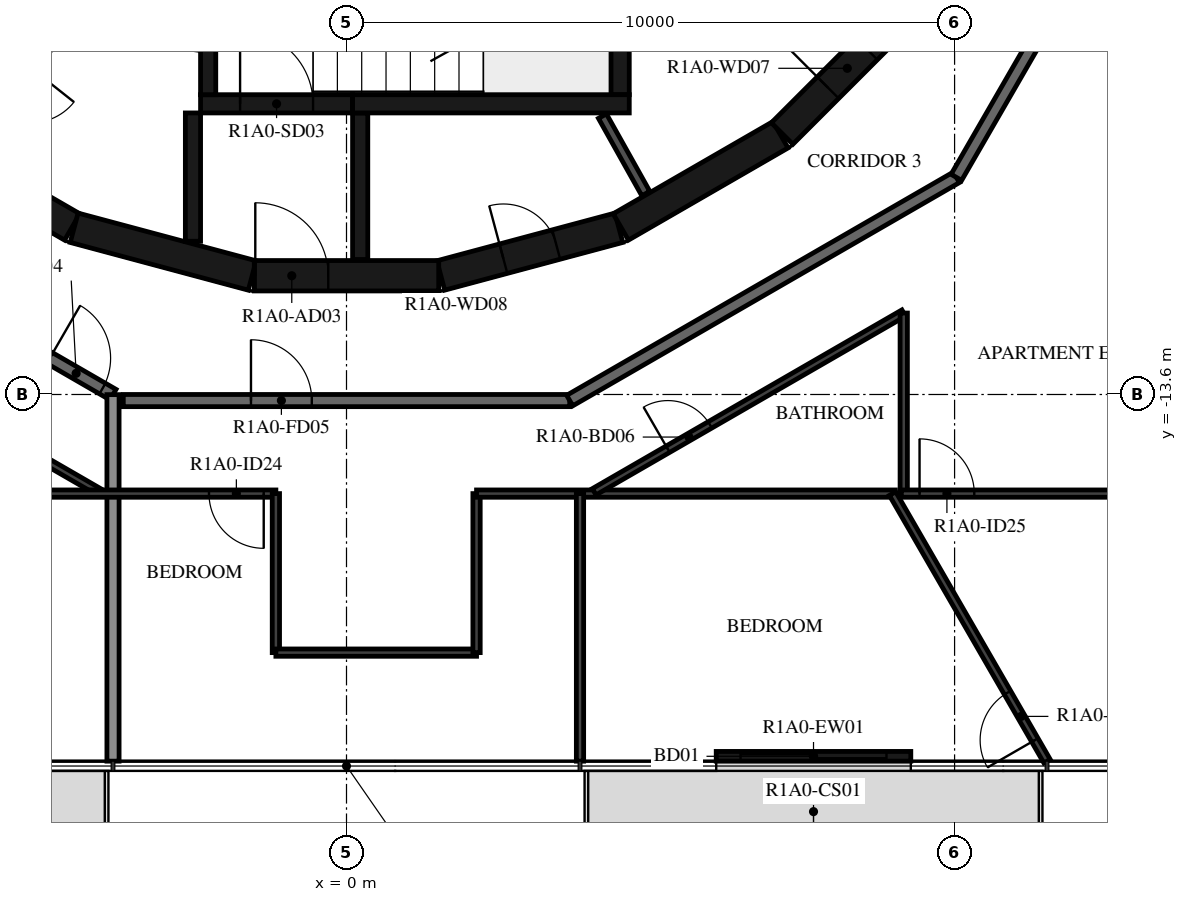
"""IFC4 building model, lengths in metres.
Left out: names, types, materials, properties, quantities, classifications, styles, units other than length and angle.
Written with IfcOpenShell. Run it as: python <this file> out.ifc"""

import sys

from ifc_helpers import new_model, si_unit, direction, frame, frame_2d, origin, place, context, subcontext, project, spatial, rectangle, extrude, element, fill, save


model = new_model("IFC4")
c1 = context("Model", 3, precision=1e-05, world=origin(), true_north=direction((0.0, 1.0)))
c2 = subcontext(c1, "Body", "Model", "MODEL_VIEW")
j1 = project(units=[si_unit("LENGTHUNIT", "METRE"), si_unit("PLANEANGLEUNIT", "RADIAN")], contexts=[c1])
p1 = place(None, origin())
s1 = spatial("IfcSite", under=j1, at=p1, CompositionType="ELEMENT")
p2 = place(p1, origin())
s2 = spatial("IfcBuilding", under=s1, at=p2, CompositionType="ELEMENT")
p3 = place(p2, frame((0.0, 0.0, 45.4)))
s3 = spatial("IfcBuildingStorey", under=s2, at=p3, CompositionType="ELEMENT", Elevation=45.4)
p4 = place(p3, frame((6.08, -19.55, 0.0), z_axis=(0.0, 0.0, 1.0), x_axis=(1.0, 0.0, 0.0)))
e1 = element("IfcWall", 1, at=p4, inside=s3, PredefinedType="STANDARD", context=c2, shape_type="SweptSolid", body=[
    extrude(rectangle(XDim=3.2, YDim=0.16, at=frame_2d((1.6, 0.0))), origin(), (0.0, 0.0, 1.0), 3.12),
])
p5 = place(p4, frame((0.4, 0.0, 0.0)))
e2 = element("IfcOpeningElement", 2, at=p5, cuts=e1, PredefinedType="OPENING", context=c2, shape_type="SweptSolid", body=[
    extrude(rectangle(XDim=2.4, YDim=2.4, at=frame_2d((1.2, 1.2))), frame((0.0, 0.09, 0.0), z_axis=(0.0, -1.0, 0.0), x_axis=(1.0, 0.0, 0.0)), (0.0, 0.0, 1.0), 0.18),
])
p6 = place(p3, frame((1.55, -11.643, 0.0), z_axis=(0.0, 0.0, 1.0), x_axis=(0.965948410781, 0.258734743916, 0.0)))
e3 = element("IfcWall", 3, at=p6, inside=s3, PredefinedType="SHEAR", context=c2, shape_type="SweptSolid", body=[
    extrude(rectangle(XDim=3.033, YDim=0.5, at=frame_2d((1.516, 0.0))), origin(), (0.0, 0.0, 1.0), 3.12),
])
p7 = place(p6, frame((1.066, 0.0, 0.0)))
e4 = element("IfcOpeningElement", 4, at=p7, cuts=e3, PredefinedType="OPENING", context=c2, shape_type="SweptSolid", body=[
    extrude(rectangle(XDim=0.9, YDim=2.1, at=frame_2d((0.45, 1.05))), frame((0.0, 0.26, 0.0), z_axis=(0.0, -1.0, 0.0), x_axis=(1.0, 0.0, 0.0)), (0.0, 0.0, 1.0), 0.52),
])
p8 = place(p3, frame((4.51, -10.845, 0.0), z_axis=(0.0, 0.0, 1.0), x_axis=(0.865975092491, 0.500087131594, 0.0)))
e5 = element("IfcWall", 5, at=p8, inside=s3, PredefinedType="SHEAR", context=c2, shape_type="SweptSolid", body=[
    extrude(rectangle(XDim=3.033, YDim=0.5, at=frame_2d((1.516, 0.0))), origin(), (0.0, 0.0, 1.0), 3.12),
])
p9 = place(p3, frame((7.164, -9.308, 0.0), z_axis=(0.0, 0.0, 1.0), x_axis=(0.707106781187, 0.707106781187, 0.0)))
e6 = element("IfcWall", 6, at=p9, inside=s3, PredefinedType="SHEAR", context=c2, shape_type="SweptSolid", body=[
    extrude(rectangle(XDim=3.032, YDim=0.5, at=frame_2d((1.516, 0.0))), origin(), (0.0, 0.0, 1.0), 3.12),
])
p10 = place(p9, frame((1.066, 0.0, 0.0)))
e7 = element("IfcOpeningElement", 7, at=p10, cuts=e6, PredefinedType="OPENING", context=c2, shape_type="SweptSolid", body=[
    extrude(rectangle(XDim=0.9, YDim=2.1, at=frame_2d((0.45, 1.05))), frame((0.0, 0.26, 0.0), z_axis=(0.0, -1.0, 0.0), x_axis=(1.0, 0.0, 0.0)), (0.0, 0.0, 1.0), 0.52),
])
for number, where, z_axis, x_axis in (
    (8, (-7.137, -9.329, 0.0), (0.0, 0.0, 1.0), (0.866, -0.5, 0.0)),
    (9, (-4.479, -10.858, 0.0), (0.0, 0.0, 1.0), (0.966, -0.259, 0.0)),
):
    element("IfcWall", number, at=place(p3, frame(where, z_axis=z_axis, x_axis=x_axis)), inside=s3, PredefinedType="SHEAR", context=c2, shape_type="SweptSolid", body=[
        extrude(rectangle(XDim=3.033, YDim=0.5, at=frame_2d((1.516, 0.0))), origin(), (0.0, 0.0, 1.0), 3.12),
    ])
p11 = place(p3, frame((-1.516, -11.647, 0.0), z_axis=(0.0, 0.0, 1.0), x_axis=(1.0, 0.0, 0.0)))
e10 = element("IfcWall", 10, at=p11, inside=s3, PredefinedType="SHEAR", context=c2, shape_type="SweptSolid", body=[
    extrude(rectangle(XDim=3.033, YDim=0.5, at=frame_2d((1.516, 0.0))), origin(), (0.0, 0.0, 1.0), 3.12),
])
p12 = place(p11, frame((0.016, 0.0, 0.0)))
e11 = element("IfcOpeningElement", 11, at=p12, cuts=e10, PredefinedType="OPENING", context=c2, shape_type="SweptSolid", body=[
    extrude(rectangle(XDim=1.2, YDim=2.1, at=frame_2d((0.6, 1.05))), frame((0.0, 0.26, 0.0), z_axis=(0.0, -1.0, 0.0), x_axis=(1.0, 0.0, 0.0)), (0.0, 0.0, 1.0), 0.52),
])
p13 = place(p3, frame((-2.275, -8.67, 0.0), z_axis=(0.0, 0.0, 1.0), x_axis=(0.0, 1.0, 0.0)))
e12 = element("IfcWall", 12, at=p13, inside=s3, PredefinedType="SHEAR", context=c2, shape_type="SweptSolid", body=[
    extrude(rectangle(XDim=3.32, YDim=0.25, at=frame_2d((1.66, 0.0))), origin(), (0.0, 0.0, 1.0), 3.12),
])
p14 = place(p3, frame((4.5, -8.67, 0.0), z_axis=(0.0, 0.0, 1.0), x_axis=(0.0, 1.0, 0.0)))
e13 = element("IfcWall", 13, at=p14, inside=s3, PredefinedType="SHEAR", context=c2, shape_type="SweptSolid", body=[
    extrude(rectangle(XDim=3.32, YDim=0.3, at=frame_2d((1.66, 0.0))), origin(), (0.0, 0.0, 1.0), 3.12),
])
p15 = place(p3, frame((0.1, -8.82, 0.0), z_axis=(0.0, 0.0, 1.0), x_axis=(1.0, 0.0, 0.0)))
e14 = element("IfcWall", 14, at=p15, inside=s3, PredefinedType="SHEAR", context=c2, shape_type="SweptSolid", body=[
    extrude(rectangle(XDim=4.55, YDim=0.3, at=frame_2d((2.275, 0.0))), origin(), (0.0, 0.0, 1.0), 3.12),
])
p16 = place(p3, frame((-2.4, -8.82, 0.0), z_axis=(0.0, 0.0, 1.0), x_axis=(1.0, 0.0, 0.0)))
e15 = element("IfcWall", 15, at=p16, inside=s3, PredefinedType="SHEAR", context=c2, shape_type="SweptSolid", body=[
    extrude(rectangle(XDim=2.5, YDim=0.3, at=frame_2d((1.25, 0.0))), origin(), (0.0, 0.0, 1.0), 3.12),
])
p17 = place(p16, frame((0.65, 0.0, 0.0)))
e16 = element("IfcOpeningElement", 16, at=p17, cuts=e15, PredefinedType="OPENING", context=c2, shape_type="SweptSolid", body=[
    extrude(rectangle(XDim=1.2, YDim=2.1, at=frame_2d((0.6, 1.05))), frame((0.0, 0.16, 0.0), z_axis=(0.0, -1.0, 0.0), x_axis=(1.0, 0.0, 0.0)), (0.0, 0.0, 1.0), 0.32),
])
p18 = place(p3, frame((-2.525, -8.97, 0.0), z_axis=(0.0, 0.0, 1.0), x_axis=(0.0, -1.0, 0.0)))
e17 = element("IfcWall", 17, at=p18, inside=s3, PredefinedType="SHEAR", context=c2, shape_type="SweptSolid", body=[
    extrude(rectangle(XDim=2.11, YDim=0.25, at=frame_2d((1.055, 0.0))), origin(), (0.0, 0.0, 1.0), 3.12),
])
p19 = place(p3, frame((0.225, -8.97, 0.0), z_axis=(0.0, 0.0, 1.0), x_axis=(0.0, -1.0, 0.0)))
e18 = element("IfcWall", 18, at=p19, inside=s3, PredefinedType="SHEAR", context=c2, shape_type="SweptSolid", body=[
    extrude(rectangle(XDim=2.41, YDim=0.25, at=frame_2d((1.205, 0.0))), origin(), (0.0, 0.0, 1.0), 3.12),
])
p20 = place(p3, frame((4.922, -10.296, 0.0), z_axis=(0.0, 0.0, 1.0), x_axis=(-0.48860846254, 0.872503163509, 0.0)))
e19 = element("IfcWall", 19, at=p20, inside=s3, PredefinedType="PARTITIONING", context=c2, shape_type="SweptSolid", body=[
    extrude(rectangle(XDim=1.459, YDim=0.15, at=frame_2d((0.73, 0.0))), origin(), (0.0, 0.0, 1.0), 3.12),
])
p21 = place(p3, frame((-4.706, -7.625, 0.0), z_axis=(0.0, 0.0, 1.0), x_axis=(-0.621392599334, -0.783499353856, 0.0)))
e20 = element("IfcWall", 20, at=p21, inside=s3, PredefinedType="PARTITIONING", context=c2, shape_type="SweptSolid", body=[
    extrude(rectangle(XDim=2.447, YDim=0.15, at=frame_2d((1.224, 0.0))), origin(), (0.0, 0.0, 1.0), 3.12),
])
p22 = place(p21, frame((0.774, 0.0, 0.0)))
e21 = element("IfcOpeningElement", 21, at=p22, cuts=e20, PredefinedType="OPENING", context=c2, shape_type="SweptSolid", body=[
    extrude(rectangle(XDim=0.9, YDim=2.1, at=frame_2d((0.45, 1.05))), frame((0.0, 0.085, 0.0), z_axis=(0.0, -1.0, 0.0), x_axis=(1.0, 0.0, 0.0)), (0.0, 0.0, 1.0), 0.17),
])
p23 = place(p3, frame((-10.029, -10.029, 0.0), z_axis=(0.0, 0.0, 1.0), x_axis=(0.866022878987, -0.500004373052, 0.0)))
e22 = element("IfcWall", 22, at=p23, inside=s3, PredefinedType="STANDARD", context=c2, shape_type="SweptSolid", body=[
    extrude(rectangle(XDim=7.146, YDim=0.2, at=frame_2d((3.573, 0.0))), origin(), (0.0, 0.0, 1.0), 3.12),
])
p24 = place(p23, frame((5.947, 0.0, 0.0)))
e23 = element("IfcOpeningElement", 23, at=p24, cuts=e22, PredefinedType="OPENING", context=c2, shape_type="SweptSolid", body=[
    extrude(rectangle(XDim=1.0, YDim=2.1, at=frame_2d((0.5, 1.05))), frame((0.0, 0.11, 0.0), z_axis=(0.0, -1.0, 0.0), x_axis=(1.0, 0.0, 0.0)), (0.0, 0.0, 1.0), 0.22),
])
p25 = place(p3, frame((-3.671, -13.7, 0.0), z_axis=(0.0, 0.0, 1.0), x_axis=(1.0, 0.0, 0.0)))
e24 = element("IfcWall", 24, at=p25, inside=s3, PredefinedType="STANDARD", context=c2, shape_type="SweptSolid", body=[
    extrude(rectangle(XDim=7.342, YDim=0.2, at=frame_2d((3.671, 0.0))), origin(), (0.0, 0.0, 1.0), 3.12),
])
p26 = place(p25, frame((2.1, 0.0, 0.0)))
e25 = element("IfcOpeningElement", 25, at=p26, cuts=e24, PredefinedType="OPENING", context=c2, shape_type="SweptSolid", body=[
    extrude(rectangle(XDim=1.0, YDim=2.1, at=frame_2d((0.5, 1.05))), frame((0.0, 0.11, 0.0), z_axis=(0.0, -1.0, 0.0), x_axis=(1.0, 0.0, 0.0)), (0.0, 0.0, 1.0), 0.22),
])
p27 = place(p3, frame((3.671, -13.7, 0.0), z_axis=(0.0, 0.0, 1.0), x_axis=(0.866024439905, 0.500001669485, 0.0)))
e26 = element("IfcWall", 26, at=p27, inside=s3, PredefinedType="STANDARD", context=c2, shape_type="SweptSolid", body=[
    extrude(rectangle(XDim=7.342, YDim=0.2, at=frame_2d((3.671, 0.0))), origin(), (0.0, 0.0, 1.0), 3.12),
])
p28 = place(p3, frame((10.029, -10.029, 0.0), z_axis=(0.0, 0.0, 1.0), x_axis=(0.50001606911, 0.866016126081, 0.0)))
e27 = element("IfcWall", 27, at=p28, inside=s3, PredefinedType="STANDARD", context=c2, shape_type="SweptSolid", body=[
    extrude(rectangle(XDim=3.671, YDim=0.2, at=frame_2d((1.835, 0.0))), origin(), (0.0, 0.0, 1.0), 3.12),
])
p29 = place(p3, frame((-3.84, -19.63, 0.0), z_axis=(0.0, 0.0, 1.0), x_axis=(0.0, 1.0, 0.0)))
e28 = element("IfcWall", 28, at=p29, inside=s3, PredefinedType="STANDARD", context=c2, shape_type="SweptSolid", body=[
    extrude(rectangle(XDim=6.028, YDim=0.2, at=frame_2d((3.014, 0.0))), origin(), (0.0, 0.0, 1.0), 2.73),
])
p30 = place(p3, frame((18.694, -10.793, 0.0), z_axis=(0.0, 0.0, 1.0), x_axis=(-0.865964895271, 0.500104789178, 0.0)))
e29 = element("IfcWall", 29, at=p30, inside=s3, PredefinedType="STANDARD", context=c2, shape_type="SweptSolid", body=[
    extrude(rectangle(XDim=7.885, YDim=0.2, at=frame_2d((3.943, 0.0))), origin(), (0.0, 0.0, 1.0), 3.12),
])
p31 = place(p3, frame((-11.127, -11.127, 0.0), z_axis=(0.0, 0.0, 1.0), x_axis=(0.866032360344, -0.499987950692, 0.0)))
e30 = element("IfcWall", 30, at=p31, inside=s3, PredefinedType="PARTITIONING", context=c2, shape_type="SweptSolid", body=[
    extrude(rectangle(XDim=8.146, YDim=0.12, at=frame_2d((4.073, 0.0))), origin(), (0.0, 0.0, 1.0), 3.12),
])
p32 = place(p31, frame((1.357, 0.0, 0.0)))
e31 = element("IfcOpeningElement", 31, at=p32, cuts=e30, PredefinedType="OPENING", context=c2, shape_type="SweptSolid", body=[
    extrude(rectangle(XDim=0.8, YDim=2.1, at=frame_2d((0.4, 1.05))), frame((0.0, 0.07, 0.0), z_axis=(0.0, -1.0, 0.0), x_axis=(1.0, 0.0, 0.0)), (0.0, 0.0, 1.0), 0.14),
])
p33 = place(p3, frame((-1.161, -15.23, 0.0), z_axis=(0.0, 0.0, 1.0), x_axis=(-1.0, 0.0, 0.0)))
e32 = element("IfcWall", 32, at=p33, inside=s3, PredefinedType="PARTITIONING", context=c2, shape_type="SweptSolid", body=[
    extrude(rectangle(XDim=18.726, YDim=0.12, at=frame_2d((9.363, 0.0))), origin(), (0.0, 0.0, 1.0), 3.12),
])
p34 = place(p33, frame((9.297, 0.0, 0.0)))
e33 = element("IfcOpeningElement", 33, at=p34, cuts=e32, PredefinedType="OPENING", context=c2, shape_type="SweptSolid", body=[
    extrude(rectangle(XDim=0.9, YDim=2.1, at=frame_2d((0.45, 1.05))), frame((0.0, 0.07, 0.0), z_axis=(0.0, -1.0, 0.0), x_axis=(1.0, 0.0, 0.0)), (0.0, 0.0, 1.0), 0.14),
])
p35 = place(p33, frame((15.755, 0.0, 0.0)))
e34 = element("IfcOpeningElement", 34, at=p35, cuts=e32, PredefinedType="OPENING", context=c2, shape_type="SweptSolid", body=[
    extrude(rectangle(XDim=0.9, YDim=2.1, at=frame_2d((0.45, 1.05))), frame((0.0, 0.07, 0.0), z_axis=(0.0, -1.0, 0.0), x_axis=(1.0, 0.0, 0.0)), (0.0, 0.0, 1.0), 0.14),
])
p36 = place(p33, frame((0.2, 0.0, 0.0)))
e35 = element("IfcOpeningElement", 35, at=p36, cuts=e32, PredefinedType="OPENING", context=c2, shape_type="SweptSolid", body=[
    extrude(rectangle(XDim=0.9, YDim=2.1, at=frame_2d((0.45, 1.05))), frame((0.0, 0.07, 0.0), z_axis=(0.0, -1.0, 0.0), x_axis=(1.0, 0.0, 0.0)), (0.0, 0.0, 1.0), 0.14),
])
p37 = place(p3, frame((-1.161, -15.23, 0.0), z_axis=(0.0, 0.0, 1.0), x_axis=(0.0, -1.0, 0.0)))
e36 = element("IfcWall", 36, at=p37, inside=s3, PredefinedType="PARTITIONING", context=c2, shape_type="SweptSolid", body=[
    extrude(rectangle(XDim=2.615, YDim=0.12, at=frame_2d((1.308, 0.0))), origin(), (0.0, 0.0, 1.0), 3.12),
])
p38 = place(p3, frame((-1.161, -17.845, 0.0), z_axis=(0.0, 0.0, 1.0), x_axis=(1.0, 0.0, 0.0)))
e37 = element("IfcWall", 37, at=p38, inside=s3, PredefinedType="PARTITIONING", context=c2, shape_type="SweptSolid", body=[
    extrude(rectangle(XDim=3.3, YDim=0.12, at=frame_2d((1.65, 0.0))), origin(), (0.0, 0.0, 1.0), 3.12),
])
p39 = place(p3, frame((2.139, -17.845, 0.0), z_axis=(0.0, 0.0, 1.0), x_axis=(0.0, 1.0, 0.0)))
e38 = element("IfcWall", 38, at=p39, inside=s3, PredefinedType="PARTITIONING", context=c2, shape_type="SweptSolid", body=[
    extrude(rectangle(XDim=2.615, YDim=0.12, at=frame_2d((1.308, 0.0))), origin(), (0.0, 0.0, 1.0), 3.12),
])
p40 = place(p3, frame((2.139, -15.23, 0.0), z_axis=(0.0, 0.0, 1.0), x_axis=(1.0, 0.0, 0.0)))
e39 = element("IfcWall", 39, at=p40, inside=s3, PredefinedType="PARTITIONING", context=c2, shape_type="SweptSolid", body=[
    extrude(rectangle(XDim=6.887, YDim=0.12, at=frame_2d((3.444, 0.0))), origin(), (0.0, 0.0, 1.0), 3.12),
])
p41 = place(p3, frame((4.073, -15.2, 0.0), z_axis=(0.0, 0.0, 1.0), x_axis=(0.866034128446, 0.499984888139, 0.0)))
e40 = element("IfcWall", 40, at=p41, inside=s3, PredefinedType="PARTITIONING", context=c2, shape_type="SweptSolid", body=[
    extrude(rectangle(XDim=5.879, YDim=0.12, at=frame_2d((2.939, 0.0))), origin(), (0.0, 0.0, 1.0), 3.12),
])
p42 = place(p41, frame((1.4, 0.0, 0.0)))
e41 = element("IfcOpeningElement", 41, at=p42, cuts=e40, PredefinedType="OPENING", context=c2, shape_type="SweptSolid", body=[
    extrude(rectangle(XDim=0.8, YDim=2.1, at=frame_2d((0.4, 1.05))), frame((0.0, 0.07, 0.0), z_axis=(0.0, -1.0, 0.0), x_axis=(1.0, 0.0, 0.0)), (0.0, 0.0, 1.0), 0.14),
])
p43 = place(p3, frame((9.164, -12.261, 0.0), z_axis=(0.0, 0.0, 1.0), x_axis=(0.0, -1.0, 0.0)))
e42 = element("IfcWall", 42, at=p43, inside=s3, PredefinedType="PARTITIONING", context=c2, shape_type="SweptSolid", body=[
    extrude(rectangle(XDim=2.969, YDim=0.12, at=frame_2d((1.485, 0.0))), origin(), (0.0, 0.0, 1.0), 3.12),
])
p44 = place(p3, frame((9.124, -15.23, 0.0), z_axis=(0.0, 0.0, 1.0), x_axis=(1.0, 0.0, 0.0)))
e43 = element("IfcWall", 43, at=p44, inside=s3, PredefinedType="PARTITIONING", context=c2, shape_type="SweptSolid", body=[
    extrude(rectangle(XDim=10.764, YDim=0.12, at=frame_2d((5.382, 0.0))), origin(), (0.0, 0.0, 1.0), 3.12),
])
p45 = place(p44, frame((0.3, 0.0, 0.0)))
e44 = element("IfcOpeningElement", 44, at=p45, cuts=e43, PredefinedType="OPENING", context=c2, shape_type="SweptSolid", body=[
    extrude(rectangle(XDim=0.9, YDim=2.1, at=frame_2d((0.45, 1.05))), frame((0.0, 0.07, 0.0), z_axis=(0.0, -1.0, 0.0), x_axis=(1.0, 0.0, 0.0)), (0.0, 0.0, 1.0), 0.14),
])
p46 = place(p44, frame((7.665, 0.0, 0.0)))
e45 = element("IfcOpeningElement", 45, at=p46, cuts=e43, PredefinedType="OPENING", context=c2, shape_type="SweptSolid", body=[
    extrude(rectangle(XDim=0.9, YDim=2.1, at=frame_2d((0.45, 1.05))), frame((0.0, 0.07, 0.0), z_axis=(0.0, -1.0, 0.0), x_axis=(1.0, 0.0, 0.0)), (0.0, 0.0, 1.0), 0.14),
])
p47 = place(p3, frame((3.84, -19.63, 0.0), z_axis=(0.0, 0.0, 1.0), x_axis=(0.0, 1.0, 0.0)))
e46 = element("IfcWall", 46, at=p47, inside=s3, PredefinedType="PARTITIONING", context=c2, shape_type="SweptSolid", body=[
    extrude(rectangle(XDim=4.4, YDim=0.12, at=frame_2d((2.2, 0.0))), origin(), (0.0, 0.0, 1.0), 2.73),
])
p48 = place(p3, frame((11.52, -19.63, 0.0), z_axis=(0.0, 0.0, 1.0), x_axis=(-0.499999763888, 0.866025540104, 0.0)))
e47 = element("IfcWall", 47, at=p48, inside=s3, PredefinedType="PARTITIONING", context=c2, shape_type="SweptSolid", body=[
    extrude(rectangle(XDim=5.081, YDim=0.12, at=frame_2d((2.54, 0.0))), origin(), (0.0, 0.0, 1.0), 3.12),
])
p49 = place(p48, frame((0.4, 0.0, 0.0)))
e48 = element("IfcOpeningElement", 48, at=p49, cuts=e47, PredefinedType="OPENING", context=c2, shape_type="SweptSolid", body=[
    extrude(rectangle(XDim=0.9, YDim=2.1, at=frame_2d((0.45, 1.05))), frame((0.0, 0.07, 0.0), z_axis=(0.0, -1.0, 0.0), x_axis=(1.0, 0.0, 0.0)), (0.0, 0.0, 1.0), 0.14),
])
p50 = place(p5, origin())
e49 = element("IfcDoor", 49, at=p50, inside=s3, OperationType="DOUBLE_DOOR_SLIDING", PredefinedType="DOOR", context=c2, shape_type="SweptSolid", body=[
    extrude(rectangle(XDim=2.4, YDim=2.4, at=frame_2d((1.2, 1.2))), frame((0.0, 0.025, 0.0), z_axis=(0.0, -1.0, 0.0), x_axis=(1.0, 0.0, 0.0)), (0.0, 0.0, 1.0), 0.05),
])
fill(e2, e49)
p51 = place(p17, origin())
e50 = element("IfcDoor", 50, at=p51, inside=s3, OperationType="SINGLE_SWING_LEFT", PredefinedType="DOOR", context=c2, shape_type="SweptSolid", body=[
    extrude(rectangle(XDim=1.2, YDim=2.1, at=frame_2d((0.6, 1.05))), frame((0.0, 0.025, 0.0), z_axis=(0.0, -1.0, 0.0), x_axis=(1.0, 0.0, 0.0)), (0.0, 0.0, 1.0), 0.05),
])
fill(e16, e50)
p52 = place(p12, origin())
e51 = element("IfcDoor", 51, at=p52, inside=s3, OperationType="SINGLE_SWING_RIGHT", PredefinedType="DOOR", context=c2, shape_type="SweptSolid", body=[
    extrude(rectangle(XDim=1.2, YDim=2.1, at=frame_2d((0.6, 1.05))), frame((0.0, 0.025, 0.0), z_axis=(0.0, -1.0, 0.0), x_axis=(1.0, 0.0, 0.0)), (0.0, 0.0, 1.0), 0.05),
])
fill(e11, e51)
p53 = place(p10, origin())
e52 = element("IfcDoor", 52, at=p53, inside=s3, OperationType="SINGLE_SWING_RIGHT", PredefinedType="DOOR", context=c2, shape_type="SweptSolid", body=[
    extrude(rectangle(XDim=0.9, YDim=2.1, at=frame_2d((0.45, 1.05))), frame((0.0, 0.025, 0.0), z_axis=(0.0, -1.0, 0.0), x_axis=(1.0, 0.0, 0.0)), (0.0, 0.0, 1.0), 0.05),
])
fill(e7, e52)
p54 = place(p7, origin())
e53 = element("IfcDoor", 53, at=p54, inside=s3, OperationType="SINGLE_SWING_LEFT", PredefinedType="DOOR", context=c2, shape_type="SweptSolid", body=[
    extrude(rectangle(XDim=0.9, YDim=2.1, at=frame_2d((0.45, 1.05))), frame((0.0, 0.025, 0.0), z_axis=(0.0, -1.0, 0.0), x_axis=(1.0, 0.0, 0.0)), (0.0, 0.0, 1.0), 0.05),
])
fill(e4, e53)
p55 = place(p24, origin())
e54 = element("IfcDoor", 54, at=p55, inside=s3, OperationType="SINGLE_SWING_LEFT", PredefinedType="DOOR", context=c2, shape_type="SweptSolid", body=[
    extrude(rectangle(XDim=1.0, YDim=2.1, at=frame_2d((0.5, 1.05))), frame((0.0, 0.025, 0.0), z_axis=(0.0, -1.0, 0.0), x_axis=(1.0, 0.0, 0.0)), (0.0, 0.0, 1.0), 0.05),
])
fill(e23, e54)
p56 = place(p26, origin())
e55 = element("IfcDoor", 55, at=p56, inside=s3, OperationType="SINGLE_SWING_LEFT", PredefinedType="DOOR", context=c2, shape_type="SweptSolid", body=[
    extrude(rectangle(XDim=1.0, YDim=2.1, at=frame_2d((0.5, 1.05))), frame((0.0, 0.025, 0.0), z_axis=(0.0, -1.0, 0.0), x_axis=(1.0, 0.0, 0.0)), (0.0, 0.0, 1.0), 0.05),
])
fill(e25, e55)
p57 = place(p36, origin())
e56 = element("IfcDoor", 56, at=p57, inside=s3, OperationType="SINGLE_SWING_LEFT", PredefinedType="DOOR", context=c2, shape_type="SweptSolid", body=[
    extrude(rectangle(XDim=0.9, YDim=2.1, at=frame_2d((0.45, 1.05))), frame((0.0, 0.025, 0.0), z_axis=(0.0, -1.0, 0.0), x_axis=(1.0, 0.0, 0.0)), (0.0, 0.0, 1.0), 0.05),
])
fill(e35, e56)
p58 = place(p42, origin())
e57 = element("IfcDoor", 57, at=p58, inside=s3, OperationType="SINGLE_SWING_RIGHT", PredefinedType="DOOR", context=c2, shape_type="SweptSolid", body=[
    extrude(rectangle(XDim=0.8, YDim=2.1, at=frame_2d((0.4, 1.05))), frame((0.0, 0.025, 0.0), z_axis=(0.0, -1.0, 0.0), x_axis=(1.0, 0.0, 0.0)), (0.0, 0.0, 1.0), 0.05),
])
fill(e41, e57)
p59 = place(p45, origin())
e58 = element("IfcDoor", 58, at=p59, inside=s3, OperationType="SINGLE_SWING_RIGHT", PredefinedType="DOOR", context=c2, shape_type="SweptSolid", body=[
    extrude(rectangle(XDim=0.9, YDim=2.1, at=frame_2d((0.45, 1.05))), frame((0.0, 0.025, 0.0), z_axis=(0.0, -1.0, 0.0), x_axis=(1.0, 0.0, 0.0)), (0.0, 0.0, 1.0), 0.05),
])
fill(e44, e58)
p60 = place(p49, origin())
e59 = element("IfcDoor", 59, at=p60, inside=s3, OperationType="SINGLE_SWING_LEFT", PredefinedType="DOOR", context=c2, shape_type="SweptSolid", body=[
    extrude(rectangle(XDim=0.9, YDim=2.1, at=frame_2d((0.45, 1.05))), frame((0.0, 0.025, 0.0), z_axis=(0.0, -1.0, 0.0), x_axis=(1.0, 0.0, 0.0)), (0.0, 0.0, 1.0), 0.05),
])
fill(e48, e59)
save(model, sys.argv[1])
